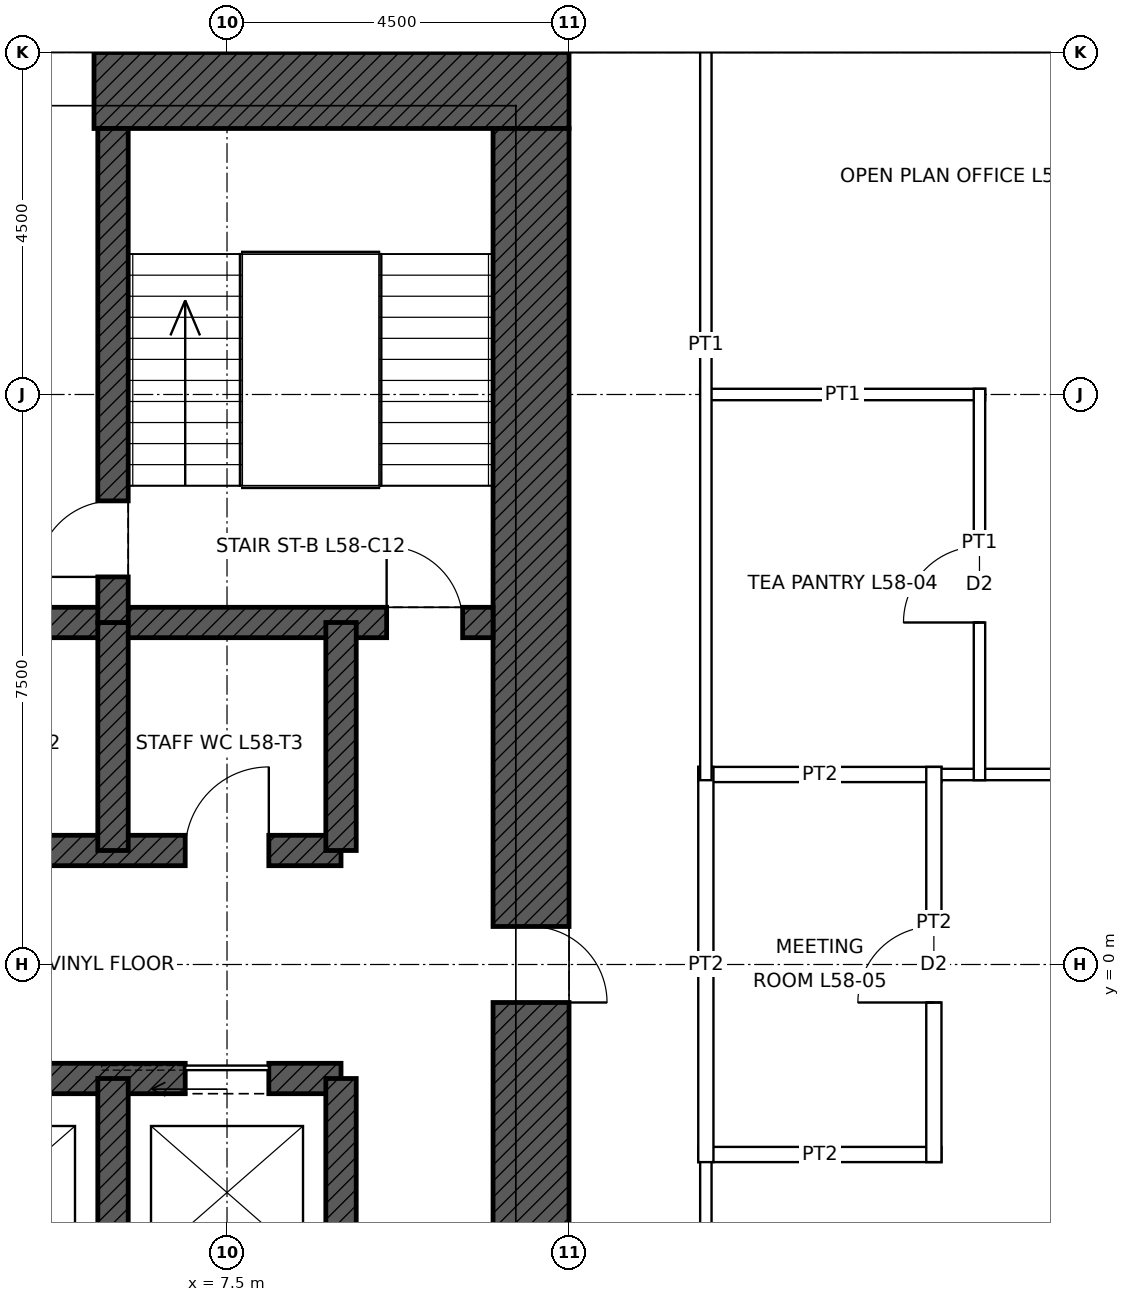
"""IFC4 building model, lengths in metres.
Left out: names, types, materials, properties, quantities, classifications, styles, units other than length and angle.
Written with IfcOpenShell. Run it as: python <this file> out.ifc"""

import sys

from ifc_helpers import new_model, si_unit, direction, frame, frame_2d, origin, place, context, subcontext, project, spatial, rectangle, extrude, element, fill, save


model = new_model("IFC4")
c1 = context("Model", 3, precision=1e-05, world=origin(), true_north=direction((0.0, 1.0)))
c2 = subcontext(c1, "Body", "Model", "MODEL_VIEW")
j1 = project(units=[si_unit("LENGTHUNIT", "METRE"), si_unit("PLANEANGLEUNIT", "RADIAN")], contexts=[c1])
p1 = place(None, origin())
s1 = spatial("IfcSite", under=j1, at=p1, CompositionType="ELEMENT")
p2 = place(p1, origin())
s2 = spatial("IfcBuilding", under=s1, at=p2, CompositionType="ELEMENT")
p3 = place(p2, frame((0.0, 0.0, 267.9)))
s3 = spatial("IfcBuildingStorey", under=s2, at=p3, CompositionType="ELEMENT", Elevation=267.9)
p4 = place(p3, frame((-12.0, 11.5, 0.0), z_axis=(0.0, 0.0, 1.0), x_axis=(1.0, 0.0, 0.0)))
e1 = element("IfcWall", 1, at=p4, inside=s3, PredefinedType="SHEAR", context=c2, shape_type="SweptSolid", body=[
    extrude(rectangle(XDim=24.0, YDim=1.0, at=frame_2d((12.0, 0.0))), origin(), (0.0, 0.0, 1.0), 4.0),
])
p5 = place(p4, frame((6.25, 0.0, 0.0)))
e2 = element("IfcOpeningElement", 2, at=p5, cuts=e1, PredefinedType="OPENING", context=c2, shape_type="SweptSolid", body=[
    extrude(rectangle(XDim=1.0, YDim=2.4, at=frame_2d((0.5, 1.2))), frame((0.0, 0.51, 0.0), z_axis=(0.0, -1.0, 0.0), x_axis=(1.0, 0.0, 0.0)), (0.0, 0.0, 1.0), 1.02),
])
p6 = place(p4, frame((16.75, 0.0, 0.0)))
e3 = element("IfcOpeningElement", 3, at=p6, cuts=e1, PredefinedType="OPENING", context=c2, shape_type="SweptSolid", body=[
    extrude(rectangle(XDim=1.0, YDim=2.4, at=frame_2d((0.5, 1.2))), frame((0.0, 0.51, 0.0), z_axis=(0.0, -1.0, 0.0), x_axis=(1.0, 0.0, 0.0)), (0.0, 0.0, 1.0), 1.02),
])
p7 = place(p3, frame((11.5, 11.0, 0.0), z_axis=(0.0, 0.0, 1.0), x_axis=(0.0, -1.0, 0.0)))
e4 = element("IfcWall", 4, at=p7, inside=s3, PredefinedType="SHEAR", context=c2, shape_type="SweptSolid", body=[
    extrude(rectangle(XDim=22.0, YDim=1.0, at=frame_2d((11.0, 0.0))), origin(), (0.0, 0.0, 1.0), 4.0),
])
p8 = place(p7, frame((10.5, 0.0, 0.0)))
e5 = element("IfcOpeningElement", 5, at=p8, cuts=e4, PredefinedType="OPENING", context=c2, shape_type="SweptSolid", body=[
    extrude(rectangle(XDim=1.0, YDim=2.4, at=frame_2d((0.5, 1.2))), frame((0.0, 0.51, 0.0), z_axis=(0.0, -1.0, 0.0), x_axis=(1.0, 0.0, 0.0)), (0.0, 0.0, 1.0), 1.02),
])
p9 = place(p3, frame((-11.0, 4.5, 0.0), z_axis=(0.0, 0.0, 1.0), x_axis=(1.0, 0.0, 0.0)))
e6 = element("IfcWall", 6, at=p9, inside=s3, PredefinedType="SHEAR", context=c2, shape_type="SweptSolid", body=[
    extrude(rectangle(XDim=22.0, YDim=0.4, at=frame_2d((11.0, 0.0))), origin(), (0.0, 0.0, 1.0), 4.0),
])
p10 = place(p9, frame((0.4, 0.0, 0.0)))
e7 = element("IfcOpeningElement", 7, at=p10, cuts=e6, PredefinedType="OPENING", context=c2, shape_type="SweptSolid", body=[
    extrude(rectangle(XDim=1.0, YDim=2.1, at=frame_2d((0.5, 1.05))), frame((0.0, 0.21, 0.0), z_axis=(0.0, -1.0, 0.0), x_axis=(1.0, 0.0, 0.0)), (0.0, 0.0, 1.0), 0.42),
])
p11 = place(p9, frame((20.6, 0.0, 0.0)))
e8 = element("IfcOpeningElement", 8, at=p11, cuts=e6, PredefinedType="OPENING", context=c2, shape_type="SweptSolid", body=[
    extrude(rectangle(XDim=1.0, YDim=2.1, at=frame_2d((0.5, 1.05))), frame((0.0, 0.21, 0.0), z_axis=(0.0, -1.0, 0.0), x_axis=(1.0, 0.0, 0.0)), (0.0, 0.0, 1.0), 0.42),
])
p12 = place(p3, frame((-9.0, 1.5, 0.0), z_axis=(0.0, 0.0, 1.0), x_axis=(1.0, 0.0, 0.0)))
e9 = element("IfcWall", 9, at=p12, inside=s3, PredefinedType="SHEAR", context=c2, shape_type="SweptSolid", body=[
    extrude(rectangle(XDim=18.0, YDim=0.4, at=frame_2d((9.0, 0.0))), origin(), (0.0, 0.0, 1.0), 4.0),
])
p13 = place(p12, frame((0.95, 0.0, 0.0)))
e10 = element("IfcOpeningElement", 10, at=p13, cuts=e9, PredefinedType="OPENING", context=c2, shape_type="SweptSolid", body=[
    extrude(rectangle(XDim=1.1, YDim=2.1, at=frame_2d((0.55, 1.05))), frame((0.0, 0.21, 0.0), z_axis=(0.0, -1.0, 0.0), x_axis=(1.0, 0.0, 0.0)), (0.0, 0.0, 1.0), 0.42),
])
p14 = place(p12, frame((3.95, 0.0, 0.0)))
e11 = element("IfcOpeningElement", 11, at=p14, cuts=e9, PredefinedType="OPENING", context=c2, shape_type="SweptSolid", body=[
    extrude(rectangle(XDim=1.1, YDim=2.1, at=frame_2d((0.55, 1.05))), frame((0.0, 0.21, 0.0), z_axis=(0.0, -1.0, 0.0), x_axis=(1.0, 0.0, 0.0)), (0.0, 0.0, 1.0), 0.42),
])
p15 = place(p12, frame((6.95, 0.0, 0.0)))
e12 = element("IfcOpeningElement", 12, at=p15, cuts=e9, PredefinedType="OPENING", context=c2, shape_type="SweptSolid", body=[
    extrude(rectangle(XDim=1.1, YDim=2.1, at=frame_2d((0.55, 1.05))), frame((0.0, 0.21, 0.0), z_axis=(0.0, -1.0, 0.0), x_axis=(1.0, 0.0, 0.0)), (0.0, 0.0, 1.0), 0.42),
])
p16 = place(p12, frame((9.95, 0.0, 0.0)))
e13 = element("IfcOpeningElement", 13, at=p16, cuts=e9, PredefinedType="OPENING", context=c2, shape_type="SweptSolid", body=[
    extrude(rectangle(XDim=1.1, YDim=2.1, at=frame_2d((0.55, 1.05))), frame((0.0, 0.21, 0.0), z_axis=(0.0, -1.0, 0.0), x_axis=(1.0, 0.0, 0.0)), (0.0, 0.0, 1.0), 0.42),
])
p17 = place(p12, frame((12.95, 0.0, 0.0)))
e14 = element("IfcOpeningElement", 14, at=p17, cuts=e9, PredefinedType="OPENING", context=c2, shape_type="SweptSolid", body=[
    extrude(rectangle(XDim=1.1, YDim=2.1, at=frame_2d((0.55, 1.05))), frame((0.0, 0.21, 0.0), z_axis=(0.0, -1.0, 0.0), x_axis=(1.0, 0.0, 0.0)), (0.0, 0.0, 1.0), 0.42),
])
p18 = place(p12, frame((15.95, 0.0, 0.0)))
e15 = element("IfcOpeningElement", 15, at=p18, cuts=e9, PredefinedType="OPENING", context=c2, shape_type="SweptSolid", body=[
    extrude(rectangle(XDim=1.1, YDim=2.1, at=frame_2d((0.55, 1.05))), frame((0.0, 0.21, 0.0), z_axis=(0.0, -1.0, 0.0), x_axis=(1.0, 0.0, 0.0)), (0.0, 0.0, 1.0), 0.42),
])
p19 = place(p3, frame((-9.0, -1.5, 0.0), z_axis=(0.0, 0.0, 1.0), x_axis=(1.0, 0.0, 0.0)))
e16 = element("IfcWall", 16, at=p19, inside=s3, PredefinedType="SHEAR", context=c2, shape_type="SweptSolid", body=[
    extrude(rectangle(XDim=18.0, YDim=0.4, at=frame_2d((9.0, 0.0))), origin(), (0.0, 0.0, 1.0), 4.0),
])
p20 = place(p19, frame((9.95, 0.0, 0.0)))
e17 = element("IfcOpeningElement", 17, at=p20, cuts=e16, PredefinedType="OPENING", context=c2, shape_type="SweptSolid", body=[
    extrude(rectangle(XDim=1.1, YDim=2.1, at=frame_2d((0.55, 1.05))), frame((0.0, 0.21, 0.0), z_axis=(0.0, -1.0, 0.0), x_axis=(1.0, 0.0, 0.0)), (0.0, 0.0, 1.0), 0.42),
])
p21 = place(p19, frame((12.95, 0.0, 0.0)))
e18 = element("IfcOpeningElement", 18, at=p21, cuts=e16, PredefinedType="OPENING", context=c2, shape_type="SweptSolid", body=[
    extrude(rectangle(XDim=1.1, YDim=2.1, at=frame_2d((0.55, 1.05))), frame((0.0, 0.21, 0.0), z_axis=(0.0, -1.0, 0.0), x_axis=(1.0, 0.0, 0.0)), (0.0, 0.0, 1.0), 0.42),
])
p22 = place(p19, frame((15.95, 0.0, 0.0)))
e19 = element("IfcOpeningElement", 19, at=p22, cuts=e16, PredefinedType="OPENING", context=c2, shape_type="SweptSolid", body=[
    extrude(rectangle(XDim=1.1, YDim=2.1, at=frame_2d((0.55, 1.05))), frame((0.0, 0.21, 0.0), z_axis=(0.0, -1.0, 0.0), x_axis=(1.0, 0.0, 0.0)), (0.0, 0.0, 1.0), 0.42),
])
p23 = place(p19, frame((0.95, 0.0, 0.0)))
e20 = element("IfcOpeningElement", 20, at=p23, cuts=e16, PredefinedType="OPENING", context=c2, shape_type="SweptSolid", body=[
    extrude(rectangle(XDim=1.1, YDim=2.1, at=frame_2d((0.55, 1.05))), frame((0.0, 0.21, 0.0), z_axis=(0.0, -1.0, 0.0), x_axis=(1.0, 0.0, 0.0)), (0.0, 0.0, 1.0), 0.42),
])
p24 = place(p19, frame((3.95, 0.0, 0.0)))
e21 = element("IfcOpeningElement", 21, at=p24, cuts=e16, PredefinedType="OPENING", context=c2, shape_type="SweptSolid", body=[
    extrude(rectangle(XDim=1.1, YDim=2.1, at=frame_2d((0.55, 1.05))), frame((0.0, 0.21, 0.0), z_axis=(0.0, -1.0, 0.0), x_axis=(1.0, 0.0, 0.0)), (0.0, 0.0, 1.0), 0.42),
])
p25 = place(p19, frame((6.95, 0.0, 0.0)))
e22 = element("IfcOpeningElement", 22, at=p25, cuts=e16, PredefinedType="OPENING", context=c2, shape_type="SweptSolid", body=[
    extrude(rectangle(XDim=1.1, YDim=2.1, at=frame_2d((0.55, 1.05))), frame((0.0, 0.21, 0.0), z_axis=(0.0, -1.0, 0.0), x_axis=(1.0, 0.0, 0.0)), (0.0, 0.0, 1.0), 0.42),
])
for number, where, z_axis, x_axis in (
    (23, (9.0, 1.5, 0.0), (0.0, 0.0, 1.0), (0.0, 1.0, 0.0)),
    (24, (9.0, -4.5, 0.0), (0.0, 0.0, 1.0), (0.0, 1.0, 0.0)),
    (25, (6.0, 1.5, 0.0), (0.0, 0.0, 1.0), (0.0, 1.0, 0.0)),
    (26, (6.0, -4.5, 0.0), (0.0, 0.0, 1.0), (0.0, 1.0, 0.0)),
):
    element("IfcWall", number, at=place(p3, frame(where, z_axis=z_axis, x_axis=x_axis)), inside=s3, PredefinedType="SHEAR", context=c2, shape_type="SweptSolid", body=[
        extrude(rectangle(XDim=3.0, YDim=0.4, at=frame_2d((1.5, 0.0))), origin(), (0.0, 0.0, 1.0), 4.0),
    ])
p26 = place(p3, frame((6.0, 4.5, 0.0), z_axis=(0.0, 0.0, 1.0), x_axis=(0.0, 1.0, 0.0)))
e27 = element("IfcWall", 27, at=p26, inside=s3, PredefinedType="SHEAR", context=c2, shape_type="SweptSolid", body=[
    extrude(rectangle(XDim=6.5, YDim=0.4, at=frame_2d((3.25, 0.0))), origin(), (0.0, 0.0, 1.0), 4.0),
])
p27 = place(p26, frame((0.6, 0.0, 0.0)))
e28 = element("IfcOpeningElement", 28, at=p27, cuts=e27, PredefinedType="OPENING", context=c2, shape_type="SweptSolid", body=[
    extrude(rectangle(XDim=1.0, YDim=2.1, at=frame_2d((0.5, 1.05))), frame((0.0, 0.21, 0.0), z_axis=(0.0, -1.0, 0.0), x_axis=(1.0, 0.0, 0.0)), (0.0, 0.0, 1.0), 0.42),
])
for number, where, z_axis, x_axis in (
    (29, (13.7, -2.5, 0.0), (0.0, 0.0, 1.0), (1.0, 0.0, 0.0)),
    (30, (13.7, 2.5, 0.0), (0.0, 0.0, 1.0), (1.0, 0.0, 0.0)),
):
    element("IfcWall", number, at=place(p3, frame(where, z_axis=z_axis, x_axis=x_axis)), inside=s3, PredefinedType="PARTITIONING", context=c2, shape_type="SweptSolid", body=[
        extrude(rectangle(XDim=3.2, YDim=0.2, at=frame_2d((1.6, 0.0))), origin(), (0.0, 0.0, 1.0), 3.85),
    ])
p28 = place(p3, frame((16.725, 2.5, 0.0), z_axis=(0.0, 0.0, 1.0), x_axis=(1.0, 0.0, 0.0)))
e31 = element("IfcWall", 31, at=p28, inside=s3, PredefinedType="PARTITIONING", context=c2, shape_type="SweptSolid", body=[
    extrude(rectangle(XDim=3.925, YDim=0.15, at=frame_2d((1.962, 0.0))), origin(), (0.0, 0.0, 1.0), 3.85),
])
p29 = place(p3, frame((13.725, 7.5, 0.0), z_axis=(0.0, 0.0, 1.0), x_axis=(1.0, 0.0, 0.0)))
e32 = element("IfcWall", 32, at=p29, inside=s3, PredefinedType="PARTITIONING", context=c2, shape_type="SweptSolid", body=[
    extrude(rectangle(XDim=3.75, YDim=0.15, at=frame_2d((1.875, 0.0))), origin(), (0.0, 0.0, 1.0), 3.243),
])
p30 = place(p3, frame((13.8, -13.875, 0.0), z_axis=(0.0, 0.0, 1.0), x_axis=(0.0, 1.0, 0.0)))
e33 = element("IfcWall", 33, at=p30, inside=s3, PredefinedType="PARTITIONING", context=c2, shape_type="SweptSolid", body=[
    extrude(rectangle(XDim=11.45, YDim=0.15, at=frame_2d((5.725, 0.0))), origin(), (0.0, 0.0, 1.0), 3.85),
])
p31 = place(p30, frame((5.225, 0.0, 0.0)))
e34 = element("IfcOpeningElement", 34, at=p31, cuts=e33, PredefinedType="OPENING", context=c2, shape_type="SweptSolid", body=[
    extrude(rectangle(XDim=1.0, YDim=2.4, at=frame_2d((0.5, 1.2))), frame((0.0, 0.085, 0.0), z_axis=(0.0, -1.0, 0.0), x_axis=(1.0, 0.0, 0.0)), (0.0, 0.0, 1.0), 0.17),
])
p32 = place(p3, frame((13.8, -2.6, 0.0), z_axis=(0.0, 0.0, 1.0), x_axis=(0.0, 1.0, 0.0)))
e35 = element("IfcWall", 35, at=p32, inside=s3, PredefinedType="PARTITIONING", context=c2, shape_type="SweptSolid", body=[
    extrude(rectangle(XDim=5.2, YDim=0.2, at=frame_2d((2.6, 0.0))), origin(), (0.0, 0.0, 1.0), 3.85),
])
p33 = place(p3, frame((13.8, 2.425, 0.0), z_axis=(0.0, 0.0, 1.0), x_axis=(0.0, 1.0, 0.0)))
e36 = element("IfcWall", 36, at=p33, inside=s3, PredefinedType="PARTITIONING", context=c2, shape_type="SweptSolid", body=[
    extrude(rectangle(XDim=11.45, YDim=0.15, at=frame_2d((5.725, 0.0))), origin(), (0.0, 0.0, 1.0), 3.85),
])
p34 = place(p3, frame((16.8, -2.6, 0.0), z_axis=(0.0, 0.0, 1.0), x_axis=(0.0, 1.0, 0.0)))
e37 = element("IfcWall", 37, at=p34, inside=s3, PredefinedType="PARTITIONING", context=c2, shape_type="SweptSolid", body=[
    extrude(rectangle(XDim=5.2, YDim=0.2, at=frame_2d((2.6, 0.0))), origin(), (0.0, 0.0, 1.0), 3.85),
])
p35 = place(p34, frame((2.1, 0.0, 0.0)))
e38 = element("IfcOpeningElement", 38, at=p35, cuts=e37, PredefinedType="OPENING", context=c2, shape_type="SweptSolid", body=[
    extrude(rectangle(XDim=1.0, YDim=2.1, at=frame_2d((0.5, 1.05))), frame((0.0, 0.11, 0.0), z_axis=(0.0, -1.0, 0.0), x_axis=(1.0, 0.0, 0.0)), (0.0, 0.0, 1.0), 0.22),
])
p36 = place(p3, frame((17.4, 2.425, 0.0), z_axis=(0.0, 0.0, 1.0), x_axis=(0.0, 1.0, 0.0)))
e39 = element("IfcWall", 39, at=p36, inside=s3, PredefinedType="PARTITIONING", context=c2, shape_type="SweptSolid", body=[
    extrude(rectangle(XDim=5.15, YDim=0.15, at=frame_2d((2.575, 0.0))), origin(), (0.0, 0.0, 1.0), 3.85),
])
p37 = place(p36, frame((2.075, 0.0, 0.0)))
e40 = element("IfcOpeningElement", 40, at=p37, cuts=e39, PredefinedType="OPENING", context=c2, shape_type="SweptSolid", body=[
    extrude(rectangle(XDim=1.0, YDim=2.1, at=frame_2d((0.5, 1.05))), frame((0.0, 0.085, 0.0), z_axis=(0.0, -1.0, 0.0), x_axis=(1.0, 0.0, 0.0)), (0.0, 0.0, 1.0), 0.17),
])
p38 = place(p11, origin())
e41 = element("IfcDoor", 41, at=p38, inside=s3, OperationType="SINGLE_SWING_LEFT", PredefinedType="DOOR", context=c2, shape_type="SweptSolid", body=[
    extrude(rectangle(XDim=1.0, YDim=2.1, at=frame_2d((0.5, 1.05))), frame((0.0, 0.025, 0.0), z_axis=(0.0, -1.0, 0.0), x_axis=(1.0, 0.0, 0.0)), (0.0, 0.0, 1.0), 0.05),
])
fill(e8, e41)
p39 = place(p27, origin())
e42 = element("IfcDoor", 42, at=p39, inside=s3, OperationType="SINGLE_SWING_LEFT", PredefinedType="DOOR", context=c2, shape_type="SweptSolid", body=[
    extrude(rectangle(XDim=1.0, YDim=2.1, at=frame_2d((0.5, 1.05))), frame((0.0, 0.025, 0.0), z_axis=(0.0, -1.0, 0.0), x_axis=(1.0, 0.0, 0.0)), (0.0, 0.0, 1.0), 0.05),
])
fill(e28, e42)
p40 = place(p6, origin())
e43 = element("IfcDoor", 43, at=p40, inside=s3, OperationType="SINGLE_SWING_RIGHT", PredefinedType="DOOR", context=c2, shape_type="SweptSolid", body=[
    extrude(rectangle(XDim=1.0, YDim=2.4, at=frame_2d((0.5, 1.2))), frame((0.0, 0.485, 0.0), z_axis=(0.0, -1.0, 0.0), x_axis=(1.0, 0.0, 0.0)), (0.0, 0.0, 1.0), 0.05),
])
fill(e3, e43)
p41 = place(p8, origin())
e44 = element("IfcDoor", 44, at=p41, inside=s3, OperationType="SINGLE_SWING_RIGHT", PredefinedType="DOOR", context=c2, shape_type="SweptSolid", body=[
    extrude(rectangle(XDim=1.0, YDim=2.4, at=frame_2d((0.5, 1.2))), frame((0.0, 0.485, 0.0), z_axis=(0.0, -1.0, 0.0), x_axis=(1.0, 0.0, 0.0)), (0.0, 0.0, 1.0), 0.05),
])
fill(e5, e44)
p42 = place(p22, origin())
e45 = element("IfcDoor", 45, at=p42, inside=s3, OperationType="SLIDING_TO_LEFT", PredefinedType="DOOR", context=c2, shape_type="SweptSolid", body=[
    extrude(rectangle(XDim=1.1, YDim=2.1, at=frame_2d((0.55, 1.05))), frame((0.0, 0.025, 0.0), z_axis=(0.0, -1.0, 0.0), x_axis=(1.0, 0.0, 0.0)), (0.0, 0.0, 1.0), 0.05),
])
fill(e19, e45)
p43 = place(p18, origin())
e46 = element("IfcDoor", 46, at=p43, inside=s3, OperationType="SINGLE_SWING_RIGHT", PredefinedType="DOOR", context=c2, shape_type="SweptSolid", body=[
    extrude(rectangle(XDim=1.1, YDim=2.1, at=frame_2d((0.55, 1.05))), frame((0.0, 0.025, 0.0), z_axis=(0.0, -1.0, 0.0), x_axis=(1.0, 0.0, 0.0)), (0.0, 0.0, 1.0), 0.05),
])
fill(e15, e46)
p44 = place(p37, origin())
e47 = element("IfcDoor", 47, at=p44, inside=s3, OperationType="SINGLE_SWING_LEFT", PredefinedType="DOOR", context=c2, shape_type="SweptSolid", body=[
    extrude(rectangle(XDim=1.0, YDim=2.1, at=frame_2d((0.5, 1.05))), frame((0.0, 0.025, 0.0), z_axis=(0.0, -1.0, 0.0), x_axis=(1.0, 0.0, 0.0)), (0.0, 0.0, 1.0), 0.05),
])
fill(e40, e47)
p45 = place(p35, origin())
e48 = element("IfcDoor", 48, at=p45, inside=s3, OperationType="SINGLE_SWING_LEFT", PredefinedType="DOOR", context=c2, shape_type="SweptSolid", body=[
    extrude(rectangle(XDim=1.0, YDim=2.1, at=frame_2d((0.5, 1.05))), frame((0.0, 0.025, 0.0), z_axis=(0.0, -1.0, 0.0), x_axis=(1.0, 0.0, 0.0)), (0.0, 0.0, 1.0), 0.05),
])
fill(e38, e48)
save(model, sys.argv[1])
